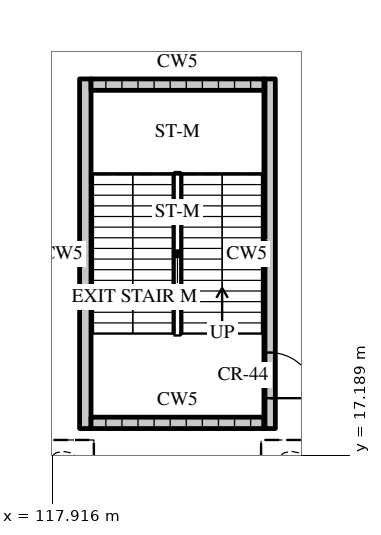
"""IFC4 building model, lengths in metres.
Left out: names, types, materials, properties, quantities, classifications, styles, units other than length and angle.
Written with IfcOpenShell. Run it as: python <this file> out.ifc"""

import sys

from ifc_helpers import new_model, si_unit, direction, frame, frame_2d, origin, place, context, subcontext, project, spatial, rectangle, extrude, element, fill, save


model = new_model("IFC4")
c1 = context("Model", 3, precision=1e-05, world=origin(), true_north=direction((0.0, 1.0)))
c2 = subcontext(c1, "Body", "Model", "MODEL_VIEW")
j1 = project(units=[si_unit("LENGTHUNIT", "METRE"), si_unit("PLANEANGLEUNIT", "RADIAN")], contexts=[c1])
p1 = place(None, origin())
s1 = spatial("IfcSite", under=j1, at=p1, CompositionType="ELEMENT")
p2 = place(p1, origin())
s2 = spatial("IfcBuilding", under=s1, at=p2, CompositionType="ELEMENT")
p3 = place(p2, frame((0.0, 0.0, -6.0)))
s3 = spatial("IfcBuildingStorey", under=s2, at=p3, CompositionType="ELEMENT", Elevation=-6.0)
p4 = place(p3, frame((118.775, 17.9, 0.0), z_axis=(0.0, 0.0, 1.0), x_axis=(0.0, 1.0, 0.0)))
e1 = element("IfcWall", 1, at=p4, inside=s3, PredefinedType="SOLIDWALL", context=c2, shape_type="SweptSolid", body=[
    extrude(rectangle(XDim=9.2, YDim=0.3, at=frame_2d((4.6, 0.0))), origin(), (0.0, 0.0, 1.0), 5.7),
])
p5 = place(p3, frame((118.925, 18.05, 0.0), z_axis=(0.0, 0.0, 1.0), x_axis=(1.0, 0.0, 0.0)))
e2 = element("IfcWall", 2, at=p5, inside=s3, PredefinedType="SOLIDWALL", context=c2, shape_type="SweptSolid", body=[
    extrude(rectangle(XDim=4.55, YDim=0.3, at=frame_2d((2.275, 0.0))), origin(), (0.0, 0.0, 1.0), 5.7),
])
p6 = place(p3, frame((123.625, 17.9, 0.0), z_axis=(0.0, 0.0, 1.0), x_axis=(0.0, 1.0, 0.0)))
e3 = element("IfcWall", 3, at=p6, inside=s3, PredefinedType="SOLIDWALL", context=c2, shape_type="SweptSolid", body=[
    extrude(rectangle(XDim=9.2, YDim=0.3, at=frame_2d((4.6, 0.0))), origin(), (0.0, 0.0, 1.0), 5.7),
])
p7 = place(p6, frame((0.8, 0.0, 0.0)))
e4 = element("IfcOpeningElement", 4, at=p7, cuts=e3, PredefinedType="OPENING", context=c2, shape_type="SweptSolid", body=[
    extrude(rectangle(XDim=1.2, YDim=2.1, at=frame_2d((0.6, 1.05))), frame((0.0, 0.16, 0.0), z_axis=(0.0, -1.0, 0.0), x_axis=(1.0, 0.0, 0.0)), (0.0, 0.0, 1.0), 0.32),
])
p8 = place(p3, frame((118.925, 26.95, 0.0), z_axis=(0.0, 0.0, 1.0), x_axis=(1.0, 0.0, 0.0)))
e5 = element("IfcWall", 5, at=p8, inside=s3, PredefinedType="SOLIDWALL", context=c2, shape_type="SweptSolid", body=[
    extrude(rectangle(XDim=4.55, YDim=0.3, at=frame_2d((2.275, 0.0))), origin(), (0.0, 0.0, 1.0), 5.7),
])
p9 = place(p7, origin())
e6 = element("IfcDoor", 6, at=p9, inside=s3, OperationType="SINGLE_SWING_RIGHT", PredefinedType="DOOR", context=c2, shape_type="SweptSolid", body=[
    extrude(rectangle(XDim=1.2, YDim=2.1, at=frame_2d((0.6, 1.05))), frame((0.0, 0.025, 0.0), z_axis=(0.0, -1.0, 0.0), x_axis=(1.0, 0.0, 0.0)), (0.0, 0.0, 1.0), 0.05),
])
fill(e4, e6)
save(model, sys.argv[1])
